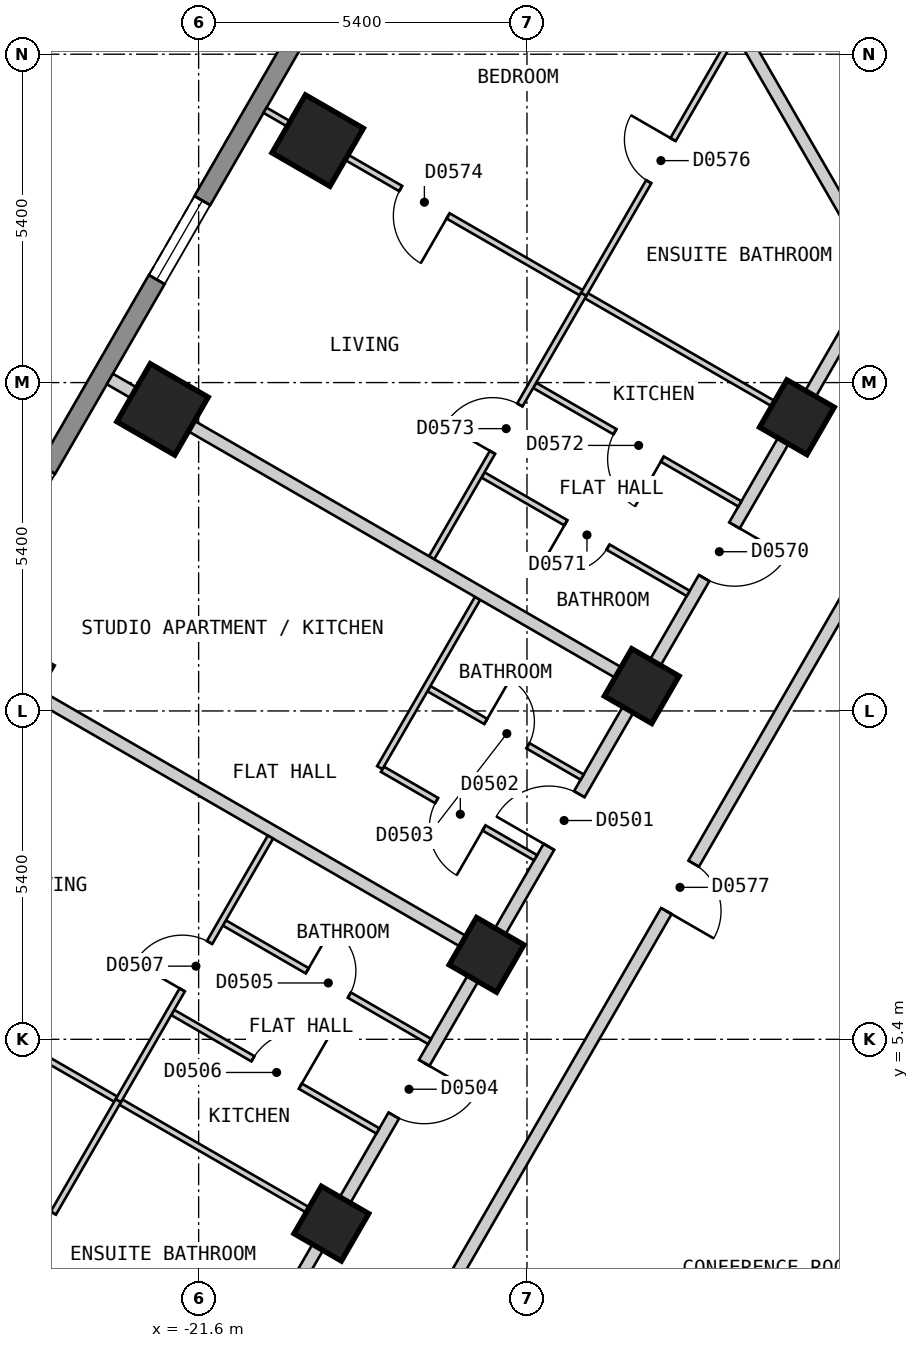
"""IFC4 building model, lengths in metres.
Left out: names, types, materials, properties, quantities, classifications, styles, units other than length and angle.
Written with IfcOpenShell. Run it as: python <this file> out.ifc"""

import sys

from ifc_helpers import new_model, si_unit, direction, frame, frame_2d, origin, origin_2d, place, context, subcontext, project, spatial, polyline, rectangle, outline, extrude, element, fill, save


model = new_model("IFC4")
c1 = context("Model", 3, precision=1e-05, world=origin(), true_north=direction((0.0, 1.0)))
c2 = subcontext(c1, "Body", "Model", "MODEL_VIEW")
j1 = project(units=[si_unit("LENGTHUNIT", "METRE"), si_unit("PLANEANGLEUNIT", "RADIAN")], contexts=[c1])
p1 = place(None, origin())
s1 = spatial("IfcSite", under=j1, at=p1, CompositionType="ELEMENT")
p2 = place(p1, origin())
s2 = spatial("IfcBuilding", under=s1, at=p2, CompositionType="ELEMENT")
p3 = place(p2, frame((0.0, 0.0, 50.4)))
s3 = spatial("IfcBuildingStorey", under=s2, at=p3, CompositionType="ELEMENT", Elevation=50.4)
for number, where, z_axis, x_axis in (
    (1, (-19.642, 20.18, 0.0), (0.0, 0.0, 1.0), (-0.5, -0.866, 0.0)),
    (2, (-22.194, 15.759, 0.0), (0.0, 0.0, 1.0), (-0.5, -0.866, 0.0)),
    (3, (-24.746, 11.339, 0.0), (0.0, 0.0, 1.0), (-0.5, -0.866, 0.0)),
):
    element("IfcColumn", number, at=place(p3, frame(where, z_axis=z_axis, x_axis=x_axis)), inside=s3, PredefinedType="COLUMN", context=c2, shape_type="SweptSolid", body=[
        extrude(rectangle(XDim=1.1, YDim=1.1, at=origin_2d()), origin(), (0.0, 0.0, 1.0), 3.0),
    ])
for number, where, z_axis, x_axis in (
    (4, (-11.761, 15.63, 0.0), (0.0, 0.0, 1.0), (-0.5, -0.866, 0.0)),
    (5, (-14.313, 11.209, 0.0), (0.0, 0.0, 1.0), (-0.5, -0.866, 0.0)),
    (6, (-16.865, 6.789, 0.0), (0.0, 0.0, 1.0), (-0.5, -0.866, 0.0)),
    (7, (-19.417, 2.369, 0.0), (0.0, 0.0, 1.0), (-0.5, -0.866, 0.0)),
):
    element("IfcColumn", number, at=place(p3, frame(where, z_axis=z_axis, x_axis=x_axis)), inside=s3, PredefinedType="COLUMN", context=c2, shape_type="SweptSolid", body=[
        extrude(rectangle(XDim=0.9, YDim=0.9, at=origin_2d()), origin(), (0.0, 0.0, 1.0), 3.0),
    ])
p4 = place(p3, frame((-17.71, 25.825, 0.0), z_axis=(0.0, 0.0, 1.0), x_axis=(-0.500001938803, -0.866024284413, 0.0)))
e8 = element("IfcWall", 8, at=p4, inside=s3, PredefinedType="SOLIDWALL", context=c2, shape_type="SweptSolid", body=[
    extrude(outline(polyline([(0.0, -0.15), (27.02, -0.15), (26.94, 0.15), (0.08, 0.15), (0.0, -0.15)])), origin(), (0.0, 0.0, 1.0), 2.7),
])
p5 = place(p4, frame((2.553, 0.0, 0.15)))
e9 = element("IfcOpeningElement", 9, at=p5, cuts=e8, PredefinedType="OPENING", context=c2, shape_type="SweptSolid", body=[
    extrude(rectangle(XDim=1.5, YDim=2.1, at=frame_2d((0.75, 1.05))), frame((0.0, 0.16, 0.0), z_axis=(0.0, -1.0, 0.0), x_axis=(1.0, 0.0, 0.0)), (0.0, 0.0, 1.0), 0.32),
])
p6 = place(p4, frame((7.658, 0.0, 0.15)))
e10 = element("IfcOpeningElement", 10, at=p6, cuts=e8, PredefinedType="OPENING", context=c2, shape_type="SweptSolid", body=[
    extrude(rectangle(XDim=1.5, YDim=2.1, at=frame_2d((0.75, 1.05))), frame((0.0, 0.16, 0.0), z_axis=(0.0, -1.0, 0.0), x_axis=(1.0, 0.0, 0.0)), (0.0, 0.0, 1.0), 0.32),
])
p7 = place(p4, frame((12.761, 0.0, 0.15)))
e11 = element("IfcOpeningElement", 11, at=p7, cuts=e8, PredefinedType="OPENING", context=c2, shape_type="SweptSolid", body=[
    extrude(rectangle(XDim=1.5, YDim=2.1, at=frame_2d((0.75, 1.05))), frame((0.0, 0.16, 0.0), z_axis=(0.0, -1.0, 0.0), x_axis=(1.0, 0.0, 0.0)), (0.0, 0.0, 1.0), 0.32),
])
p8 = place(p4, frame((17.865, 0.0, 0.15)))
e12 = element("IfcOpeningElement", 12, at=p8, cuts=e8, PredefinedType="OPENING", context=c2, shape_type="SweptSolid", body=[
    extrude(rectangle(XDim=1.5, YDim=2.1, at=frame_2d((0.75, 1.05))), frame((0.0, 0.16, 0.0), z_axis=(0.0, -1.0, 0.0), x_axis=(1.0, 0.0, 0.0)), (0.0, 0.0, 1.0), 0.32),
])
p9 = place(p4, frame((22.969, 0.0, 0.15)))
e13 = element("IfcOpeningElement", 13, at=p9, cuts=e8, PredefinedType="OPENING", context=c2, shape_type="SweptSolid", body=[
    extrude(rectangle(XDim=1.5, YDim=2.1, at=frame_2d((0.75, 1.05))), frame((0.0, 0.16, 0.0), z_axis=(0.0, -1.0, 0.0), x_axis=(1.0, 0.0, 0.0)), (0.0, 0.0, 1.0), 0.32),
])
p10 = place(p3, frame((-18.244, -0.001, 0.0), z_axis=(0.0, 0.0, 1.0), x_axis=(0.499962999376, 0.866046765051, 0.0)))
e14 = element("IfcWall", 14, at=p10, inside=s3, PredefinedType="PARTITIONING", context=c2, shape_type="SweptSolid", body=[
    extrude(rectangle(XDim=18.245, YDim=0.2, at=frame_2d((9.123, 0.0))), origin(), (0.0, 0.0, 1.0), 2.7),
])
p11 = place(p10, frame((8.672, 0.0, 0.0)))
e15 = element("IfcOpeningElement", 15, at=p11, cuts=e14, PredefinedType="OPENING", context=c2, shape_type="SweptSolid", body=[
    extrude(rectangle(XDim=0.9, YDim=2.1, at=frame_2d((0.45, 1.05))), frame((0.0, 0.11, 0.0), z_axis=(0.0, -1.0, 0.0), x_axis=(1.0, 0.0, 0.0)), (0.0, 0.0, 1.0), 0.22),
])
p12 = place(p3, frame((-20.727, 0.099, 0.0), z_axis=(0.0, 0.0, 1.0), x_axis=(0.499993204491, 0.866029327138, 0.0)))
e16 = element("IfcWall", 16, at=p12, inside=s3, PredefinedType="PARTITIONING", context=c2, shape_type="SweptSolid", body=[
    extrude(rectangle(XDim=20.554, YDim=0.2, at=frame_2d((10.277, 0.0))), origin(), (0.0, 0.0, 1.0), 2.7),
])
p13 = place(p12, frame((9.776, 0.0, 0.0)))
e17 = element("IfcOpeningElement", 17, at=p13, cuts=e16, PredefinedType="OPENING", context=c2, shape_type="SweptSolid", body=[
    extrude(rectangle(XDim=1.0, YDim=2.1, at=frame_2d((0.5, 1.05))), frame((0.0, 0.11, 0.0), z_axis=(0.0, -1.0, 0.0), x_axis=(1.0, 0.0, 0.0)), (0.0, 0.0, 1.0), 0.22),
])
p14 = place(p12, frame((4.673, 0.0, 0.0)))
e18 = element("IfcOpeningElement", 18, at=p14, cuts=e16, PredefinedType="OPENING", context=c2, shape_type="SweptSolid", body=[
    extrude(rectangle(XDim=1.0, YDim=2.1, at=frame_2d((0.5, 1.05))), frame((0.0, 0.11, 0.0), z_axis=(0.0, -1.0, 0.0), x_axis=(1.0, 0.0, 0.0)), (0.0, 0.0, 1.0), 0.22),
])
p15 = place(p12, frame((14.88, 0.0, 0.0)))
e19 = element("IfcOpeningElement", 19, at=p15, cuts=e16, PredefinedType="OPENING", context=c2, shape_type="SweptSolid", body=[
    extrude(rectangle(XDim=1.0, YDim=2.1, at=frame_2d((0.5, 1.05))), frame((0.0, 0.11, 0.0), z_axis=(0.0, -1.0, 0.0), x_axis=(1.0, 0.0, 0.0)), (0.0, 0.0, 1.0), 0.22),
])
p16 = place(p3, frame((-21.177, 7.314, 0.0), z_axis=(0.0, 0.0, 1.0), x_axis=(0.865979019114, -0.500080332001, 0.0)))
e20 = element("IfcWall", 20, at=p16, inside=s3, PredefinedType="PARTITIONING", context=c2, shape_type="SweptSolid", body=[
    extrude(rectangle(XDim=3.897, YDim=0.1, at=frame_2d((1.949, 0.0))), origin(), (0.0, 0.0, 1.0), 2.7),
])
p17 = place(p16, frame((1.574, 0.0, 0.0)))
e21 = element("IfcOpeningElement", 21, at=p17, cuts=e20, PredefinedType="OPENING", context=c2, shape_type="SweptSolid", body=[
    extrude(rectangle(XDim=0.8, YDim=2.1, at=frame_2d((0.4, 1.05))), frame((0.0, 0.06, 0.0), z_axis=(0.0, -1.0, 0.0), x_axis=(1.0, 0.0, 0.0)), (0.0, 0.0, 1.0), 0.12),
])
p18 = place(p3, frame((-22.027, 5.842, 0.0), z_axis=(0.0, 0.0, 1.0), x_axis=(0.865979019114, -0.500080332001, 0.0)))
e22 = element("IfcWall", 22, at=p18, inside=s3, PredefinedType="PARTITIONING", context=c2, shape_type="SweptSolid", body=[
    extrude(rectangle(XDim=3.897, YDim=0.1, at=frame_2d((1.949, 0.0))), origin(), (0.0, 0.0, 1.0), 2.7),
])
p19 = place(p18, frame((1.524, 0.0, 0.0)))
e23 = element("IfcOpeningElement", 23, at=p19, cuts=e22, PredefinedType="OPENING", context=c2, shape_type="SweptSolid", body=[
    extrude(rectangle(XDim=0.9, YDim=2.1, at=frame_2d((0.45, 1.05))), frame((0.0, 0.06, 0.0), z_axis=(0.0, -1.0, 0.0), x_axis=(1.0, 0.0, 0.0)), (0.0, 0.0, 1.0), 0.12),
])
p20 = place(p3, frame((-28.164, 7.419, 0.0), z_axis=(0.0, 0.0, 1.0), x_axis=(0.866047370643, -0.499961950354, 0.0)))
e24 = element("IfcWall", 24, at=p20, inside=s3, PredefinedType="PARTITIONING", context=c2, shape_type="SweptSolid", body=[
    extrude(rectangle(XDim=10.001, YDim=0.1, at=frame_2d((5.0, 0.0))), origin(), (0.0, 0.0, 1.0), 2.7),
])
p21 = place(p20, frame((2.577, 0.0, 0.0)))
e25 = element("IfcOpeningElement", 25, at=p21, cuts=e24, PredefinedType="OPENING", context=c2, shape_type="SweptSolid", body=[
    extrude(rectangle(XDim=0.9, YDim=2.1, at=frame_2d((0.45, 1.05))), frame((0.0, 0.06, 0.0), z_axis=(0.0, -1.0, 0.0), x_axis=(1.0, 0.0, 0.0)), (0.0, 0.0, 1.0), 0.12),
])
p22 = place(p3, frame((-18.577, 9.841, 0.0), z_axis=(0.0, 0.0, 1.0), x_axis=(0.865899003441, -0.500218867937, 0.0)))
e26 = element("IfcWall", 26, at=p22, inside=s3, PredefinedType="PARTITIONING", context=c2, shape_type="SweptSolid", body=[
    extrude(rectangle(XDim=2.909, YDim=0.1, at=frame_2d((1.455, 0.0))), origin(), (0.0, 0.0, 1.0), 2.7),
])
p23 = place(p22, frame((1.029, 0.0, 0.0)))
e27 = element("IfcOpeningElement", 27, at=p23, cuts=e26, PredefinedType="OPENING", context=c2, shape_type="SweptSolid", body=[
    extrude(rectangle(XDim=0.9, YDim=2.1, at=frame_2d((0.45, 1.05))), frame((0.0, 0.06, 0.0), z_axis=(0.0, -1.0, 0.0), x_axis=(1.0, 0.0, 0.0)), (0.0, 0.0, 1.0), 0.12),
])
p24 = place(p3, frame((-16.923, 14.681, 0.0), z_axis=(0.0, 0.0, 1.0), x_axis=(0.866087525071, -0.499892387336, 0.0)))
e28 = element("IfcWall", 28, at=p24, inside=s3, PredefinedType="PARTITIONING", context=c2, shape_type="SweptSolid", body=[
    extrude(rectangle(XDim=3.897, YDim=0.1, at=frame_2d((1.948, 0.0))), origin(), (0.0, 0.0, 1.0), 2.7),
])
p25 = place(p24, frame((1.574, 0.0, 0.0)))
e29 = element("IfcOpeningElement", 29, at=p25, cuts=e28, PredefinedType="OPENING", context=c2, shape_type="SweptSolid", body=[
    extrude(rectangle(XDim=0.8, YDim=2.1, at=frame_2d((0.4, 1.05))), frame((0.0, 0.06, 0.0), z_axis=(0.0, -1.0, 0.0), x_axis=(1.0, 0.0, 0.0)), (0.0, 0.0, 1.0), 0.12),
])
p26 = place(p3, frame((-16.073, 16.154, 0.0), z_axis=(0.0, 0.0, 1.0), x_axis=(0.865979019114, -0.500080332001, 0.0)))
e30 = element("IfcWall", 30, at=p26, inside=s3, PredefinedType="PARTITIONING", context=c2, shape_type="SweptSolid", body=[
    extrude(rectangle(XDim=3.897, YDim=0.1, at=frame_2d((1.949, 0.0))), origin(), (0.0, 0.0, 1.0), 2.7),
])
p27 = place(p26, frame((1.524, 0.0, 0.0)))
e31 = element("IfcOpeningElement", 31, at=p27, cuts=e30, PredefinedType="OPENING", context=c2, shape_type="SweptSolid", body=[
    extrude(rectangle(XDim=0.9, YDim=2.1, at=frame_2d((0.45, 1.05))), frame((0.0, 0.06, 0.0), z_axis=(0.0, -1.0, 0.0), x_axis=(1.0, 0.0, 0.0)), (0.0, 0.0, 1.0), 0.12),
])
p28 = place(p3, frame((-17.813, 11.167, 0.0), z_axis=(0.0, 0.0, 1.0), x_axis=(0.866087824531, -0.499891868507, 0.0)))
e32 = element("IfcWall", 32, at=p28, inside=s3, PredefinedType="PARTITIONING", context=c2, shape_type="SweptSolid", body=[
    extrude(rectangle(XDim=2.911, YDim=0.1, at=frame_2d((1.456, 0.0))), origin(), (0.0, 0.0, 1.0), 2.7),
])
p29 = place(p28, frame((1.08, 0.0, 0.0)))
e33 = element("IfcOpeningElement", 33, at=p29, cuts=e32, PredefinedType="OPENING", context=c2, shape_type="SweptSolid", body=[
    extrude(rectangle(XDim=0.8, YDim=2.1, at=frame_2d((0.4, 1.05))), frame((0.0, 0.06, 0.0), z_axis=(0.0, -1.0, 0.0), x_axis=(1.0, 0.0, 0.0)), (0.0, 0.0, 1.0), 0.12),
])
p30 = place(p3, frame((-20.508, 20.679, 0.0), z_axis=(0.0, 0.0, 1.0), x_axis=(0.866047370643, -0.499961950354, 0.0)))
e34 = element("IfcWall", 34, at=p30, inside=s3, PredefinedType="PARTITIONING", context=c2, shape_type="SweptSolid", body=[
    extrude(rectangle(XDim=10.001, YDim=0.1, at=frame_2d((5.0, 0.0))), origin(), (0.0, 0.0, 1.0), 2.7),
])
p31 = place(p30, frame((2.576, 0.0, 0.0)))
e35 = element("IfcOpeningElement", 35, at=p31, cuts=e34, PredefinedType="OPENING", context=c2, shape_type="SweptSolid", body=[
    extrude(rectangle(XDim=0.9, YDim=2.1, at=frame_2d((0.45, 1.05))), frame((0.0, 0.06, 0.0), z_axis=(0.0, -1.0, 0.0), x_axis=(1.0, 0.0, 0.0)), (0.0, 0.0, 1.0), 0.12),
])
p32 = place(p3, frame((-18.621, 9.867, 0.0), z_axis=(0.0, 0.0, 1.0), x_axis=(0.500197891286, 0.865911121047, 0.0)))
e36 = element("IfcWall", 36, at=p32, inside=s3, PredefinedType="PARTITIONING", context=c2, shape_type="SweptSolid", body=[
    extrude(rectangle(XDim=3.215, YDim=0.1, at=frame_2d((1.607, 0.0))), origin(), (0.0, 0.0, 1.0), 2.7),
])
p33 = place(p3, frame((-25.358, 0.173, 0.0), z_axis=(0.0, 0.0, 1.0), x_axis=(0.500180754623, 0.8659210199, 0.0)))
e37 = element("IfcWall", 37, at=p33, inside=s3, PredefinedType="PARTITIONING", context=c2, shape_type="SweptSolid", body=[
    extrude(rectangle(XDim=4.872, YDim=0.1, at=frame_2d((2.436, 0.0))), origin(), (0.0, 0.0, 1.0), 2.7),
])
p34 = place(p33, frame((1.936, 0.0, 0.0)))
e38 = element("IfcOpeningElement", 38, at=p34, cuts=e37, PredefinedType="OPENING", context=c2, shape_type="SweptSolid", body=[
    extrude(rectangle(XDim=0.8, YDim=2.1, at=frame_2d((0.4, 1.05))), frame((0.0, 0.06, 0.0), z_axis=(0.0, -1.0, 0.0), x_axis=(1.0, 0.0, 0.0)), (0.0, 0.0, 1.0), 0.12),
])
p35 = place(p3, frame((-17.768, 13.319, 0.0), z_axis=(0.0, 0.0, 1.0), x_axis=(0.499958946799, 0.866049104564, 0.0)))
e39 = element("IfcWall", 39, at=p35, inside=s3, PredefinedType="PARTITIONING", context=c2, shape_type="SweptSolid", body=[
    extrude(rectangle(XDim=5.004, YDim=0.1, at=frame_2d((2.502, 0.0))), origin(), (0.0, 0.0, 1.0), 2.7),
])
p36 = place(p35, frame((2.002, 0.0, 0.0)))
e40 = element("IfcOpeningElement", 40, at=p36, cuts=e39, PredefinedType="OPENING", context=c2, shape_type="SweptSolid", body=[
    extrude(rectangle(XDim=0.9, YDim=2.1, at=frame_2d((0.45, 1.05))), frame((0.0, 0.06, 0.0), z_axis=(0.0, -1.0, 0.0), x_axis=(1.0, 0.0, 0.0)), (0.0, 0.0, 1.0), 0.12),
])
p37 = place(p3, frame((-12.629, 21.874, 0.0), z_axis=(0.0, 0.0, 1.0), x_axis=(0.500024801635, -0.86601108408, 0.0)))
e41 = element("IfcWall", 41, at=p37, inside=s3, PredefinedType="PARTITIONING", context=c2, shape_type="SweptSolid", body=[
    extrude(rectangle(XDim=4.473, YDim=0.2, at=frame_2d((2.237, 0.0))), origin(), (0.0, 0.0, 1.0), 2.7),
])
p38 = place(p3, frame((-25.611, 11.839, 0.0), z_axis=(0.0, 0.0, 1.0), x_axis=(0.866022959057, -0.500004234368, 0.0)))
e42 = element("IfcWall", 42, at=p38, inside=s3, PredefinedType="PARTITIONING", context=c2, shape_type="SweptSolid", body=[
    extrude(rectangle(XDim=10.0, YDim=0.2, at=frame_2d((5.0, 0.0))), origin(), (0.0, 0.0, 1.0), 2.7),
])
p39 = place(p3, frame((-23.06, 16.259, 0.0), z_axis=(0.0, 0.0, 1.0), x_axis=(0.866047370643, -0.499961950354, 0.0)))
e43 = element("IfcWall", 43, at=p39, inside=s3, PredefinedType="PARTITIONING", context=c2, shape_type="SweptSolid", body=[
    extrude(rectangle(XDim=10.001, YDim=0.2, at=frame_2d((5.0, 0.0))), origin(), (0.0, 0.0, 1.0), 2.7),
])
p40 = place(p3, frame((-22.921, 4.392, 0.0), z_axis=(0.0, 0.0, 1.0), x_axis=(0.499958946799, 0.866049104564, 0.0)))
e44 = element("IfcWall", 44, at=p40, inside=s3, PredefinedType="PARTITIONING", context=c2, shape_type="SweptSolid", body=[
    extrude(rectangle(XDim=5.004, YDim=0.1, at=frame_2d((2.502, 0.0))), origin(), (0.0, 0.0, 1.0), 2.7),
])
p41 = place(p40, frame((2.103, 0.0, 0.0)))
e45 = element("IfcOpeningElement", 45, at=p41, cuts=e44, PredefinedType="OPENING", context=c2, shape_type="SweptSolid", body=[
    extrude(rectangle(XDim=0.9, YDim=2.1, at=frame_2d((0.45, 1.05))), frame((0.0, 0.06, 0.0), z_axis=(0.0, -1.0, 0.0), x_axis=(1.0, 0.0, 0.0)), (0.0, 0.0, 1.0), 0.12),
])
p42 = place(p3, frame((-15.266, 17.653, 0.0), z_axis=(0.0, 0.0, 1.0), x_axis=(0.500007182864, 0.866021256716, 0.0)))
e46 = element("IfcWall", 46, at=p42, inside=s3, PredefinedType="PARTITIONING", context=c2, shape_type="SweptSolid", body=[
    extrude(rectangle(XDim=4.874, YDim=0.1, at=frame_2d((2.437, 0.0))), origin(), (0.0, 0.0, 1.0), 2.7),
])
p43 = place(p42, frame((2.137, 0.0, 0.0)))
e47 = element("IfcOpeningElement", 47, at=p43, cuts=e46, PredefinedType="OPENING", context=c2, shape_type="SweptSolid", body=[
    extrude(rectangle(XDim=0.8, YDim=2.1, at=frame_2d((0.4, 1.05))), frame((0.0, 0.06, 0.0), z_axis=(0.0, -1.0, 0.0), x_axis=(1.0, 0.0, 0.0)), (0.0, 0.0, 1.0), 0.12),
])
p44 = place(p6, origin())
e48 = element("IfcWindow", 48, at=p44, inside=s3, PartitioningType="SINGLE_PANEL", PredefinedType="WINDOW", context=c2, shape_type="SweptSolid", body=[
    extrude(rectangle(XDim=1.5, YDim=2.1, at=frame_2d((0.75, 1.05))), frame((0.0, 0.03, 0.0), z_axis=(0.0, -1.0, 0.0), x_axis=(1.0, 0.0, 0.0)), (0.0, 0.0, 1.0), 0.06),
])
fill(e10, e48)
p45 = place(p13, origin())
e49 = element("IfcDoor", 49, at=p45, inside=s3, OperationType="SINGLE_SWING_LEFT", PredefinedType="DOOR", context=c2, shape_type="SweptSolid", body=[
    extrude(rectangle(XDim=1.0, YDim=2.1, at=frame_2d((0.5, 1.05))), frame((0.0, 0.025, 0.0), z_axis=(0.0, -1.0, 0.0), x_axis=(1.0, 0.0, 0.0)), (0.0, 0.0, 1.0), 0.05),
])
fill(e17, e49)
p46 = place(p23, origin())
e50 = element("IfcDoor", 50, at=p46, inside=s3, OperationType="SINGLE_SWING_RIGHT", PredefinedType="DOOR", context=c2, shape_type="SweptSolid", body=[
    extrude(rectangle(XDim=0.9, YDim=2.1, at=frame_2d((0.45, 1.05))), frame((0.0, 0.025, 0.0), z_axis=(0.0, -1.0, 0.0), x_axis=(1.0, 0.0, 0.0)), (0.0, 0.0, 1.0), 0.05),
])
fill(e27, e50)
p47 = place(p29, origin())
e51 = element("IfcDoor", 51, at=p47, inside=s3, OperationType="SINGLE_SWING_LEFT", PredefinedType="DOOR", context=c2, shape_type="SweptSolid", body=[
    extrude(rectangle(XDim=0.8, YDim=2.1, at=frame_2d((0.4, 1.05))), frame((0.0, 0.025, 0.0), z_axis=(0.0, -1.0, 0.0), x_axis=(1.0, 0.0, 0.0)), (0.0, 0.0, 1.0), 0.05),
])
fill(e33, e51)
p48 = place(p14, origin())
e52 = element("IfcDoor", 52, at=p48, inside=s3, OperationType="SINGLE_SWING_RIGHT", PredefinedType="DOOR", context=c2, shape_type="SweptSolid", body=[
    extrude(rectangle(XDim=1.0, YDim=2.1, at=frame_2d((0.5, 1.05))), frame((0.0, 0.025, 0.0), z_axis=(0.0, -1.0, 0.0), x_axis=(1.0, 0.0, 0.0)), (0.0, 0.0, 1.0), 0.05),
])
fill(e18, e52)
p49 = place(p17, origin())
e53 = element("IfcDoor", 53, at=p49, inside=s3, OperationType="SINGLE_SWING_LEFT", PredefinedType="DOOR", context=c2, shape_type="SweptSolid", body=[
    extrude(rectangle(XDim=0.8, YDim=2.1, at=frame_2d((0.4, 1.05))), frame((0.0, 0.025, 0.0), z_axis=(0.0, -1.0, 0.0), x_axis=(1.0, 0.0, 0.0)), (0.0, 0.0, 1.0), 0.05),
])
fill(e21, e53)
p50 = place(p19, origin())
e54 = element("IfcDoor", 54, at=p50, inside=s3, OperationType="SINGLE_SWING_RIGHT", PredefinedType="DOOR", context=c2, shape_type="SweptSolid", body=[
    extrude(rectangle(XDim=0.9, YDim=2.1, at=frame_2d((0.45, 1.05))), frame((0.0, 0.025, 0.0), z_axis=(0.0, -1.0, 0.0), x_axis=(1.0, 0.0, 0.0)), (0.0, 0.0, 1.0), 0.05),
])
fill(e23, e54)
p51 = place(p41, origin())
e55 = element("IfcDoor", 55, at=p51, inside=s3, OperationType="SINGLE_SWING_LEFT", PredefinedType="DOOR", context=c2, shape_type="SweptSolid", body=[
    extrude(rectangle(XDim=0.9, YDim=2.1, at=frame_2d((0.45, 1.05))), frame((0.0, 0.025, 0.0), z_axis=(0.0, -1.0, 0.0), x_axis=(1.0, 0.0, 0.0)), (0.0, 0.0, 1.0), 0.05),
])
fill(e45, e55)
p52 = place(p34, origin())
e56 = element("IfcDoor", 56, at=p52, inside=s3, OperationType="SINGLE_SWING_RIGHT", PredefinedType="DOOR", context=c2, shape_type="SweptSolid", body=[
    extrude(rectangle(XDim=0.8, YDim=2.1, at=frame_2d((0.4, 1.05))), frame((0.0, 0.025, 0.0), z_axis=(0.0, -1.0, 0.0), x_axis=(1.0, 0.0, 0.0)), (0.0, 0.0, 1.0), 0.05),
])
fill(e38, e56)
p53 = place(p15, origin())
e57 = element("IfcDoor", 57, at=p53, inside=s3, OperationType="SINGLE_SWING_RIGHT", PredefinedType="DOOR", context=c2, shape_type="SweptSolid", body=[
    extrude(rectangle(XDim=1.0, YDim=2.1, at=frame_2d((0.5, 1.05))), frame((0.0, 0.025, 0.0), z_axis=(0.0, -1.0, 0.0), x_axis=(1.0, 0.0, 0.0)), (0.0, 0.0, 1.0), 0.05),
])
fill(e19, e57)
p54 = place(p25, origin())
e58 = element("IfcDoor", 58, at=p54, inside=s3, OperationType="SINGLE_SWING_LEFT", PredefinedType="DOOR", context=c2, shape_type="SweptSolid", body=[
    extrude(rectangle(XDim=0.8, YDim=2.1, at=frame_2d((0.4, 1.05))), frame((0.0, 0.025, 0.0), z_axis=(0.0, -1.0, 0.0), x_axis=(1.0, 0.0, 0.0)), (0.0, 0.0, 1.0), 0.05),
])
fill(e29, e58)
p55 = place(p27, origin())
e59 = element("IfcDoor", 59, at=p55, inside=s3, OperationType="SINGLE_SWING_RIGHT", PredefinedType="DOOR", context=c2, shape_type="SweptSolid", body=[
    extrude(rectangle(XDim=0.9, YDim=2.1, at=frame_2d((0.45, 1.05))), frame((0.0, 0.025, 0.0), z_axis=(0.0, -1.0, 0.0), x_axis=(1.0, 0.0, 0.0)), (0.0, 0.0, 1.0), 0.05),
])
fill(e31, e59)
p56 = place(p36, origin())
e60 = element("IfcDoor", 60, at=p56, inside=s3, OperationType="SINGLE_SWING_LEFT", PredefinedType="DOOR", context=c2, shape_type="SweptSolid", body=[
    extrude(rectangle(XDim=0.9, YDim=2.1, at=frame_2d((0.45, 1.05))), frame((0.0, 0.025, 0.0), z_axis=(0.0, -1.0, 0.0), x_axis=(1.0, 0.0, 0.0)), (0.0, 0.0, 1.0), 0.05),
])
fill(e40, e60)
p57 = place(p31, origin())
e61 = element("IfcDoor", 61, at=p57, inside=s3, OperationType="SINGLE_SWING_RIGHT", PredefinedType="DOOR", context=c2, shape_type="SweptSolid", body=[
    extrude(rectangle(XDim=0.9, YDim=2.1, at=frame_2d((0.45, 1.05))), frame((0.0, 0.025, 0.0), z_axis=(0.0, -1.0, 0.0), x_axis=(1.0, 0.0, 0.0)), (0.0, 0.0, 1.0), 0.05),
])
fill(e35, e61)
p58 = place(p43, origin())
e62 = element("IfcDoor", 62, at=p58, inside=s3, OperationType="SINGLE_SWING_RIGHT", PredefinedType="DOOR", context=c2, shape_type="SweptSolid", body=[
    extrude(rectangle(XDim=0.8, YDim=2.1, at=frame_2d((0.4, 1.05))), frame((0.0, 0.025, 0.0), z_axis=(0.0, -1.0, 0.0), x_axis=(1.0, 0.0, 0.0)), (0.0, 0.0, 1.0), 0.05),
])
fill(e47, e62)
p59 = place(p11, origin())
e63 = element("IfcDoor", 63, at=p59, inside=s3, OperationType="SINGLE_SWING_LEFT", PredefinedType="DOOR", context=c2, shape_type="SweptSolid", body=[
    extrude(rectangle(XDim=0.9, YDim=2.1, at=frame_2d((0.45, 1.05))), frame((0.0, 0.025, 0.0), z_axis=(0.0, -1.0, 0.0), x_axis=(1.0, 0.0, 0.0)), (0.0, 0.0, 1.0), 0.05),
])
fill(e15, e63)
save(model, sys.argv[1])
